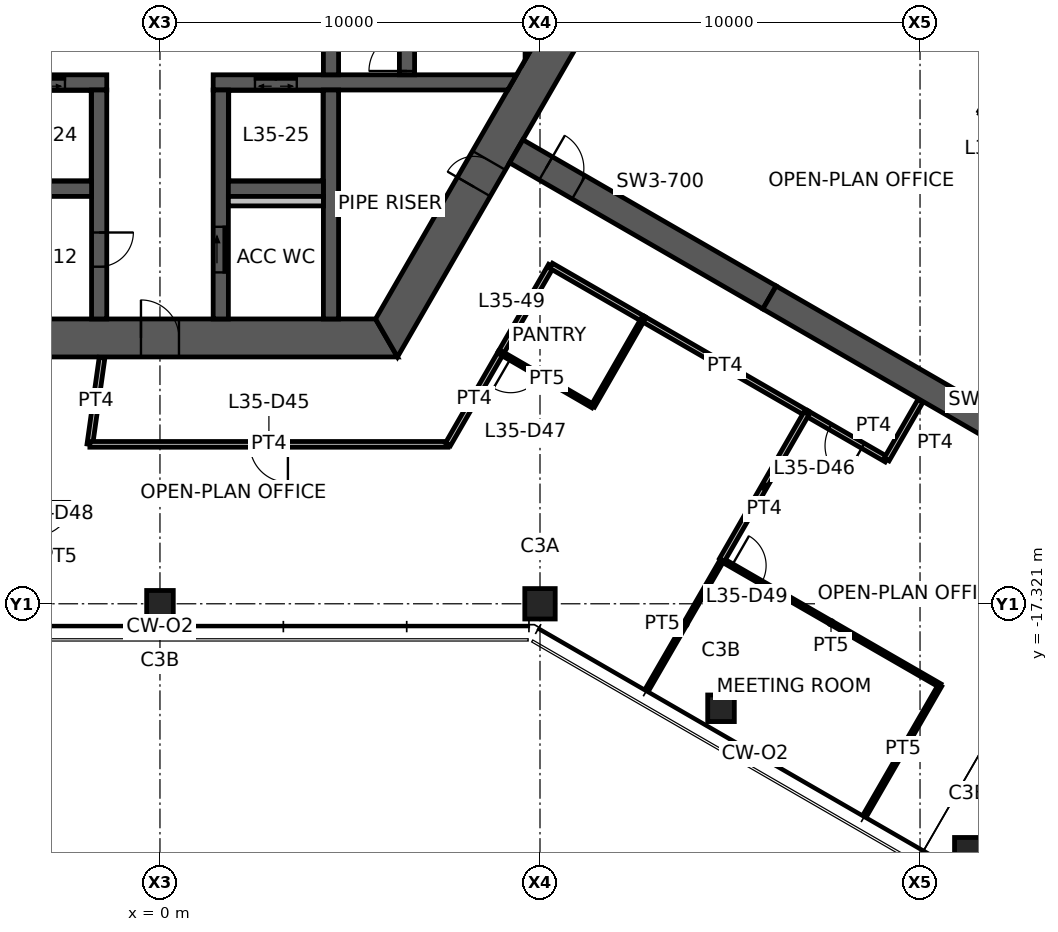
"""IFC4 building model, lengths in metres.
Left out: names, types, materials, properties, quantities, classifications, styles, units other than length and angle.
Written with IfcOpenShell. Run it as: python <this file> out.ifc"""

import sys

from ifc_helpers import new_model, si_unit, direction, frame, frame_2d, origin, origin_2d, place, context, subcontext, project, spatial, polyline, rectangle, hollow_rectangle, outline, extrude, element, fill, save


model = new_model("IFC4")
c1 = context("Model", 3, precision=1e-05, world=origin(), true_north=direction((0.0, 1.0)))
c2 = subcontext(c1, "Body", "Model", "MODEL_VIEW")
j1 = project(units=[si_unit("LENGTHUNIT", "METRE"), si_unit("PLANEANGLEUNIT", "RADIAN")], contexts=[c1])
p1 = place(None, origin())
s1 = spatial("IfcSite", under=j1, at=p1, CompositionType="ELEMENT")
p2 = place(p1, origin())
s2 = spatial("IfcBuilding", under=s1, at=p2, CompositionType="ELEMENT")
p3 = place(p2, frame((0.0, 0.0, 140.9)))
s3 = spatial("IfcBuildingStorey", under=s2, at=p3, CompositionType="ELEMENT", Elevation=140.9)
p4 = place(p3, frame((10.0, -17.321, 0.0), z_axis=(0.0, 0.0, 1.0), x_axis=(1.0, 0.0, 0.0)))
e1 = element("IfcColumn", 1, at=p4, inside=s3, PredefinedType="COLUMN", context=c2, shape_type="SweptSolid", body=[
    extrude(hollow_rectangle(XDim=0.8, YDim=0.8, WallThickness=0.045, at=origin_2d()), origin(), (0.0, 0.0, 1.0), 3.9),
])
for number, where, z_axis, x_axis in (
    (2, (0.0, -17.321, 0.0), (0.0, 0.0, 1.0), (1.0, 0.0, 0.0)),
    (3, (14.763, -20.071, 0.0), (0.0, 0.0, 1.0), (1.0, 0.0, 0.0)),
    (4, (21.258, -23.821, 0.0), (0.0, 0.0, 1.0), (1.0, 0.0, 0.0)),
):
    element("IfcColumn", number, at=place(p3, frame(where, z_axis=z_axis, x_axis=x_axis)), inside=s3, PredefinedType="COLUMN", context=c2, shape_type="SweptSolid", body=[
        extrude(hollow_rectangle(XDim=0.7, YDim=0.7, WallThickness=0.036, at=origin_2d()), origin(), (0.0, 0.0, 1.0), 3.9),
    ])
p5 = place(p3, frame((-5.961, -10.325, 0.0), z_axis=(0.0, 0.0, 1.0), x_axis=(1.0, 0.0, 0.0)))
e5 = element("IfcWall", 5, at=p5, inside=s3, PredefinedType="SHEAR", context=c2, shape_type="SweptSolid", body=[
    extrude(outline(polyline([(-0.289, -0.5), (5.461, -0.5), (6.461, -0.5), (12.211, -0.5), (11.634, 0.5), (6.461, 0.5), (5.461, 0.5), (0.289, 0.5), (-0.289, -0.5)])), origin(), (0.0, 0.0, 1.0), 3.9),
])
p6 = place(p5, frame((5.461, 0.0, 0.0)))
e6 = element("IfcOpeningElement", 6, at=p6, cuts=e5, PredefinedType="OPENING", context=c2, shape_type="SweptSolid", body=[
    extrude(rectangle(XDim=1.0, YDim=2.1, at=frame_2d((0.5, 1.05))), frame((0.0, 0.51, 0.0), z_axis=(0.0, -1.0, 0.0), x_axis=(1.0, 0.0, 0.0)), (0.0, 0.0, 1.0), 1.02),
])
p7 = place(p3, frame((5.961, -10.325, 0.0), z_axis=(0.0, 0.0, 1.0), x_axis=(0.500004296715, 0.866022923061, 0.0)))
e7 = element("IfcWall", 7, at=p7, inside=s3, PredefinedType="SHEAR", context=c2, shape_type="SweptSolid", body=[
    extrude(outline(polyline([(-0.289, -0.5), (4.594, -0.5), (5.394, -0.5), (12.211, -0.5), (11.634, 0.5), (5.394, 0.5), (4.594, 0.5), (0.289, 0.5), (-0.289, -0.5)])), origin(), (0.0, 0.0, 1.0), 3.9),
])
p8 = place(p7, frame((4.594, 0.0, 0.0)))
e8 = element("IfcOpeningElement", 8, at=p8, cuts=e7, PredefinedType="OPENING", context=c2, shape_type="SweptSolid", body=[
    extrude(rectangle(XDim=0.8, YDim=2.1, at=frame_2d((0.4, 1.05))), frame((0.0, 0.51, 0.0), z_axis=(0.0, -1.0, 0.0), x_axis=(1.0, 0.0, 0.0)), (0.0, 0.0, 1.0), 1.02),
])
p9 = place(p3, frame((9.375, -5.413, 0.0), z_axis=(0.0, 0.0, 1.0), x_axis=(0.866032377459, -0.499987921047, 0.0)))
e9 = element("IfcWall", 9, at=p9, inside=s3, PredefinedType="SHEAR", context=c2, shape_type="SweptSolid", body=[
    extrude(rectangle(XDim=7.696, YDim=0.7, at=frame_2d((3.848, 0.0))), origin(), (0.0, 0.0, 1.0), 3.9),
])
p10 = place(p9, frame((0.9, 0.0, 0.0)))
e10 = element("IfcOpeningElement", 10, at=p10, cuts=e9, PredefinedType="OPENING", context=c2, shape_type="SweptSolid", body=[
    extrude(rectangle(XDim=1.0, YDim=2.1, at=frame_2d((0.5, 1.05))), frame((0.0, 0.36, 0.0), z_axis=(0.0, -1.0, 0.0), x_axis=(1.0, 0.0, 0.0)), (0.0, 0.0, 1.0), 0.72),
])
p11 = place(p3, frame((16.039, -9.26, 0.0), z_axis=(0.0, 0.0, 1.0), x_axis=(0.866024837091, -0.50000098154, 0.0)))
e11 = element("IfcWall", 11, at=p11, inside=s3, PredefinedType="SHEAR", context=c2, shape_type="SweptSolid", body=[
    extrude(rectangle(XDim=13.0, YDim=0.7, at=frame_2d((6.5, 0.0))), origin(), (0.0, 0.0, 1.0), 3.9),
])
p12 = place(p3, frame((-9.266, -3.6, 0.0), z_axis=(0.0, 0.0, 1.0), x_axis=(1.0, 0.0, 0.0)))
e12 = element("IfcWall", 12, at=p12, inside=s3, PredefinedType="SHEAR", context=c2, shape_type="SweptSolid", body=[
    extrude(outline(polyline([(0.115, -0.2), (3.116, -0.2), (4.417, -0.2), (5.667, -0.2), (6.767, -0.2), (7.866, -0.2), (7.866, 0.2), (6.767, 0.2), (5.667, 0.2), (4.417, 0.2), (3.116, 0.2), (-0.115, 0.2), (0.115, -0.2)])), origin(), (0.0, 0.0, 1.0), 3.9),
])
p13 = place(p12, frame((5.667, 0.0, 0.0)))
e13 = element("IfcOpeningElement", 13, at=p13, cuts=e12, PredefinedType="OPENING", context=c2, shape_type="SweptSolid", body=[
    extrude(rectangle(XDim=1.1, YDim=2.1, at=frame_2d((0.55, 1.05))), frame((0.0, 0.21, 0.0), z_axis=(0.0, -1.0, 0.0), x_axis=(1.0, 0.0, 0.0)), (0.0, 0.0, 1.0), 0.42),
])
p14 = place(p12, frame((3.116, 0.0, 0.0)))
e14 = element("IfcOpeningElement", 14, at=p14, cuts=e12, PredefinedType="OPENING", context=c2, shape_type="SweptSolid", body=[
    extrude(rectangle(XDim=1.3, YDim=2.1, at=frame_2d((0.65, 1.05))), frame((0.0, 0.21, 0.0), z_axis=(0.0, -1.0, 0.0), x_axis=(1.0, 0.0, 0.0)), (0.0, 0.0, 1.0), 0.42),
])
p15 = place(p3, frame((1.4, -3.6, 0.0), z_axis=(0.0, 0.0, 1.0), x_axis=(1.0, 0.0, 0.0)))
e15 = element("IfcWall", 15, at=p15, inside=s3, PredefinedType="SHEAR", context=c2, shape_type="SweptSolid", body=[
    extrude(outline(polyline([(0.0, -0.2), (1.1, -0.2), (2.2, -0.2), (7.751, -0.2), (7.982, 0.2), (2.2, 0.2), (1.1, 0.2), (0.0, 0.2), (0.0, -0.2)])), origin(), (0.0, 0.0, 1.0), 3.9),
])
p16 = place(p15, frame((1.1, 0.0, 0.0)))
e16 = element("IfcOpeningElement", 16, at=p16, cuts=e15, PredefinedType="OPENING", context=c2, shape_type="SweptSolid", body=[
    extrude(rectangle(XDim=1.1, YDim=2.1, at=frame_2d((0.55, 1.05))), frame((0.0, 0.21, 0.0), z_axis=(0.0, -1.0, 0.0), x_axis=(1.0, 0.0, 0.0)), (0.0, 0.0, 1.0), 0.42),
])
p17 = place(p3, frame((-1.6, -3.8, 0.0), z_axis=(0.0, 0.0, 1.0), x_axis=(0.0, -1.0, 0.0)))
e17 = element("IfcWall", 17, at=p17, inside=s3, PredefinedType="SHEAR", context=c2, shape_type="SweptSolid", body=[
    extrude(rectangle(XDim=6.025, YDim=0.4, at=frame_2d((3.012, 0.0))), origin(), (0.0, 0.0, 1.0), 3.9),
])
p18 = place(p17, frame((3.75, 0.0, 0.0)))
e18 = element("IfcOpeningElement", 18, at=p18, cuts=e17, PredefinedType="OPENING", context=c2, shape_type="SweptSolid", body=[
    extrude(rectangle(XDim=0.9, YDim=2.1, at=frame_2d((0.45, 1.05))), frame((0.0, 0.21, 0.0), z_axis=(0.0, -1.0, 0.0), x_axis=(1.0, 0.0, 0.0)), (0.0, 0.0, 1.0), 0.42),
])
p19 = place(p3, frame((1.6, -3.8, 0.0), z_axis=(0.0, 0.0, 1.0), x_axis=(0.0, -1.0, 0.0)))
e19 = element("IfcWall", 19, at=p19, inside=s3, PredefinedType="SHEAR", context=c2, shape_type="SweptSolid", body=[
    extrude(rectangle(XDim=6.025, YDim=0.4, at=frame_2d((3.012, 0.0))), origin(), (0.0, 0.0, 1.0), 3.9),
])
p20 = place(p19, frame((3.6, 0.0, 0.0)))
e20 = element("IfcOpeningElement", 20, at=p20, cuts=e19, PredefinedType="OPENING", context=c2, shape_type="SweptSolid", body=[
    extrude(rectangle(XDim=1.2, YDim=2.1, at=frame_2d((0.6, 1.05))), frame((0.0, 0.21, 0.0), z_axis=(0.0, -1.0, 0.0), x_axis=(1.0, 0.0, 0.0)), (0.0, 0.0, 1.0), 0.42),
])
p21 = place(p3, frame((4.5, -3.4, 0.0), z_axis=(0.0, 0.0, 1.0), x_axis=(0.0, 1.0, 0.0)))
e21 = element("IfcWall", 21, at=p21, inside=s3, PredefinedType="SHEAR", context=c2, shape_type="SweptSolid", body=[
    extrude(rectangle(XDim=6.8, YDim=0.4, at=frame_2d((3.4, 0.0))), origin(), (0.0, 0.0, 1.0), 3.9),
])
p22 = place(p21, frame((2.9, 0.0, 0.0)))
e22 = element("IfcOpeningElement", 22, at=p22, cuts=e21, PredefinedType="OPENING", context=c2, shape_type="SweptSolid", body=[
    extrude(rectangle(XDim=1.0, YDim=2.1, at=frame_2d((0.5, 1.05))), frame((0.0, 0.21, 0.0), z_axis=(0.0, -1.0, 0.0), x_axis=(1.0, 0.0, 0.0)), (0.0, 0.0, 1.0), 0.42),
])
p23 = place(p3, frame((6.5, -3.4, 0.0), z_axis=(0.0, 0.0, 1.0), x_axis=(0.0, 1.0, 0.0)))
e23 = element("IfcWall", 23, at=p23, inside=s3, PredefinedType="SHEAR", context=c2, shape_type="SweptSolid", body=[
    extrude(rectangle(XDim=6.8, YDim=0.4, at=frame_2d((3.4, 0.0))), origin(), (0.0, 0.0, 1.0), 3.9),
])
p24 = place(p23, frame((0.1, 0.0, 0.0)))
e24 = element("IfcOpeningElement", 24, at=p24, cuts=e23, PredefinedType="OPENING", context=c2, shape_type="SweptSolid", body=[
    extrude(rectangle(XDim=1.0, YDim=2.1, at=frame_2d((0.5, 1.05))), frame((0.0, 0.21, 0.0), z_axis=(0.0, -1.0, 0.0), x_axis=(1.0, 0.0, 0.0)), (0.0, 0.0, 1.0), 0.42),
])
p25 = place(p3, frame((4.5, -3.8, 0.0), z_axis=(0.0, 0.0, 1.0), x_axis=(0.0, -1.0, 0.0)))
e25 = element("IfcWall", 25, at=p25, inside=s3, PredefinedType="SHEAR", context=c2, shape_type="SweptSolid", body=[
    extrude(rectangle(XDim=6.025, YDim=0.4, at=frame_2d((3.012, 0.0))), origin(), (0.0, 0.0, 1.0), 3.9),
])
for number, where, z_axis, x_axis in (
    (26, (-4.3, -6.4, 0.0), (0.0, 0.0, 1.0), (1.0, 0.0, 0.0)),
    (27, (1.8, -6.4, 0.0), (0.0, 0.0, 1.0), (1.0, 0.0, 0.0)),
):
    element("IfcWall", number, at=place(p3, frame(where, z_axis=z_axis, x_axis=x_axis)), inside=s3, PredefinedType="SHEAR", context=c2, shape_type="SweptSolid", body=[
        extrude(rectangle(XDim=2.5, YDim=0.4, at=frame_2d((1.25, 0.0))), origin(), (0.0, 0.0, 1.0), 3.9),
    ])
p26 = place(p3, frame((9.808, -2.662, 0.0), z_axis=(0.0, 0.0, 1.0), x_axis=(0.0, 1.0, 0.0)))
e28 = element("IfcWall", 28, at=p26, inside=s3, PredefinedType="SHEAR", context=c2, shape_type="SweptSolid", body=[
    extrude(outline(polyline([(0.346, -0.2), (4.978, -0.2), (5.671, 0.2), (-0.346, 0.2), (0.346, -0.2)])), origin(), (0.0, 0.0, 1.0), 3.9),
])
p27 = place(p3, frame((1.8, -6.725, 0.0), z_axis=(0.0, 0.0, 1.0), x_axis=(1.0, 0.0, 0.0)))
e29 = element("IfcWall", 29, at=p27, inside=s3, PredefinedType="PLUMBINGWALL", context=c2, shape_type="SweptSolid", body=[
    extrude(rectangle(XDim=2.5, YDim=0.25, at=frame_2d((1.25, 0.0))), origin(), (0.0, 0.0, 1.0), 3.9),
])
p28 = place(p3, frame((10.292, -8.425, 0.0), z_axis=(0.0, 0.0, 1.0), x_axis=(-0.499966561876, -0.866044708433, 0.0)))
e30 = element("IfcWall", 30, at=p28, inside=s3, PredefinedType="PARTITIONING", context=c2, shape_type="SweptSolid", body=[
    extrude(rectangle(XDim=2.655, YDim=0.15, at=frame_2d((1.328, 0.0))), origin(), (0.0, 0.0, 1.0), 2.95),
])
p29 = place(p3, frame((12.721, -9.827, 0.0), z_axis=(0.0, 0.0, 1.0), x_axis=(-0.866049342339, 0.499958534914, 0.0)))
e31 = element("IfcWall", 31, at=p29, inside=s3, PredefinedType="PARTITIONING", context=c2, shape_type="SweptSolid", body=[
    extrude(rectangle(XDim=2.805, YDim=0.15, at=frame_2d((1.402, 0.0))), origin(), (0.0, 0.0, 1.0), 2.95),
])
p30 = place(p3, frame((-1.844, -13.125, 0.0), z_axis=(0.0, 0.0, 1.0), x_axis=(0.139119980631, 0.990275532864, 0.0)))
e32 = element("IfcWall", 32, at=p30, inside=s3, PredefinedType="PARTITIONING", context=c2, shape_type="SweptSolid", body=[
    extrude(rectangle(XDim=2.302, YDim=0.15, at=frame_2d((1.151, 0.0))), origin(), (0.0, 0.0, 1.0), 2.95),
])
p31 = place(p3, frame((7.578, -13.125, 0.0), z_axis=(0.0, 0.0, 1.0), x_axis=(-1.0, 0.0, 0.0)))
e33 = element("IfcWall", 33, at=p31, inside=s3, PredefinedType="PARTITIONING", context=c2, shape_type="SweptSolid", body=[
    extrude(rectangle(XDim=9.422, YDim=0.15, at=frame_2d((4.711, 0.0))), origin(), (0.0, 0.0, 1.0), 2.95),
])
p32 = place(p31, frame((4.211, 0.0, 0.0)))
e34 = element("IfcOpeningElement", 34, at=p32, cuts=e33, PredefinedType="OPENING", context=c2, shape_type="SweptSolid", body=[
    extrude(rectangle(XDim=1.0, YDim=2.1, at=frame_2d((0.5, 1.05))), frame((0.0, 0.085, 0.0), z_axis=(0.0, -1.0, 0.0), x_axis=(1.0, 0.0, 0.0)), (0.0, 0.0, 1.0), 0.17),
])
p33 = place(p3, frame((8.969, -10.716, 0.0), z_axis=(0.0, 0.0, 1.0), x_axis=(-0.500008568482, -0.866020456713, 0.0)))
e35 = element("IfcWall", 35, at=p33, inside=s3, PredefinedType="PARTITIONING", context=c2, shape_type="SweptSolid", body=[
    extrude(rectangle(XDim=2.782, YDim=0.15, at=frame_2d((1.391, 0.0))), origin(), (0.0, 0.0, 1.0), 2.95),
])
p34 = place(p3, frame((17.021, -12.31, 0.0), z_axis=(0.0, 0.0, 1.0), x_axis=(-0.866018071205, 0.500012700186, 0.0)))
e36 = element("IfcWall", 36, at=p34, inside=s3, PredefinedType="PARTITIONING", context=c2, shape_type="SweptSolid", body=[
    extrude(rectangle(XDim=4.975, YDim=0.15, at=frame_2d((2.488, 0.0))), origin(), (0.0, 0.0, 1.0), 2.95),
])
p35 = place(p3, frame((19.121, -13.522, 0.0), z_axis=(0.0, 0.0, 1.0), x_axis=(-0.866000196749, 0.500043657324, 0.0)))
e37 = element("IfcWall", 37, at=p35, inside=s3, PredefinedType="PARTITIONING", context=c2, shape_type="SweptSolid", body=[
    extrude(rectangle(XDim=2.434, YDim=0.15, at=frame_2d((1.217, 0.0))), origin(), (0.0, 0.0, 1.0), 2.95),
])
p36 = place(p35, frame((0.717, 0.0, 0.0)))
e38 = element("IfcOpeningElement", 38, at=p36, cuts=e37, PredefinedType="OPENING", context=c2, shape_type="SweptSolid", body=[
    extrude(rectangle(XDim=1.0, YDim=2.1, at=frame_2d((0.5, 1.05))), frame((0.0, 0.085, 0.0), z_axis=(0.0, -1.0, 0.0), x_axis=(1.0, 0.0, 0.0)), (0.0, 0.0, 1.0), 0.17),
])
p37 = place(p3, frame((20.011, -11.981, 0.0), z_axis=(0.0, 0.0, 1.0), x_axis=(-0.500062787734, -0.865989150234, 0.0)))
e39 = element("IfcWall", 39, at=p37, inside=s3, PredefinedType="PARTITIONING", context=c2, shape_type="SweptSolid", body=[
    extrude(rectangle(XDim=1.78, YDim=0.15, at=frame_2d((0.89, 0.0))), origin(), (0.0, 0.0, 1.0), 2.95),
])
p38 = place(p3, frame((11.392, -12.119, 0.0), z_axis=(0.0, 0.0, 1.0), x_axis=(-0.865255114713, 0.501331812737, 0.0)))
e40 = element("IfcWall", 40, at=p38, inside=s3, PredefinedType="PARTITIONING", context=c2, shape_type="SweptSolid", body=[
    extrude(rectangle(XDim=2.8, YDim=0.1, at=frame_2d((1.4, 0.0))), origin(), (0.0, 0.0, 1.0), 2.95),
])
p39 = place(p38, frame((1.6, 0.0, 0.0)))
e41 = element("IfcOpeningElement", 41, at=p39, cuts=e40, PredefinedType="OPENING", context=c2, shape_type="SweptSolid", body=[
    extrude(rectangle(XDim=0.9, YDim=2.1, at=frame_2d((0.45, 1.05))), frame((0.0, 0.06, 0.0), z_axis=(0.0, -1.0, 0.0), x_axis=(1.0, 0.0, 0.0)), (0.0, 0.0, 1.0), 0.12),
])
p40 = place(p3, frame((12.713, -9.822, 0.0), z_axis=(0.0, 0.0, 1.0), x_axis=(-0.49852824611, -0.866873455488, 0.0)))
e42 = element("IfcWall", 42, at=p40, inside=s3, PredefinedType="PARTITIONING", context=c2, shape_type="SweptSolid", body=[
    extrude(rectangle(XDim=2.65, YDim=0.1, at=frame_2d((1.325, 0.0))), origin(), (0.0, 0.0, 1.0), 2.95),
])
p41 = place(p3, frame((12.84, -19.543, 0.0), z_axis=(0.0, 0.0, 1.0), x_axis=(0.501092951989, 0.865393467428, 0.0)))
e43 = element("IfcWall", 43, at=p41, inside=s3, PredefinedType="PARTITIONING", context=c2, shape_type="SweptSolid", body=[
    extrude(rectangle(XDim=3.905, YDim=0.1, at=frame_2d((1.953, 0.0))), origin(), (0.0, 0.0, 1.0), 2.95),
])
p42 = place(p3, frame((14.79, -16.165, 0.0), z_axis=(0.0, 0.0, 1.0), x_axis=(0.866359914703, -0.499420161984, 0.0)))
e44 = element("IfcWall", 44, at=p42, inside=s3, PredefinedType="PARTITIONING", context=c2, shape_type="SweptSolid", body=[
    extrude(rectangle(XDim=6.619, YDim=0.1, at=frame_2d((3.31, 0.0))), origin(), (0.0, 0.0, 1.0), 2.95),
])
p43 = place(p42, frame((0.3, 0.0, 0.0)))
e45 = element("IfcOpeningElement", 45, at=p43, cuts=e44, PredefinedType="OPENING", context=c2, shape_type="SweptSolid", body=[
    extrude(rectangle(XDim=0.9, YDim=2.1, at=frame_2d((0.45, 1.05))), frame((0.0, 0.06, 0.0), z_axis=(0.0, -1.0, 0.0), x_axis=(1.0, 0.0, 0.0)), (0.0, 0.0, 1.0), 0.12),
])
p44 = place(p3, frame((20.525, -19.471, 0.0), z_axis=(0.0, 0.0, 1.0), x_axis=(-0.499996613652, -0.866027358884, 0.0)))
e46 = element("IfcWall", 46, at=p44, inside=s3, PredefinedType="PARTITIONING", context=c2, shape_type="SweptSolid", body=[
    extrude(rectangle(XDim=3.88, YDim=0.1, at=frame_2d((1.94, 0.0))), origin(), (0.0, 0.0, 1.0), 2.95),
])
p45 = place(p3, frame((17.013, -12.305, 0.0), z_axis=(0.0, 0.0, 1.0), x_axis=(-0.499081704511, -0.866554933182, 0.0)))
e47 = element("IfcWall", 47, at=p45, inside=s3, PredefinedType="PARTITIONING", context=c2, shape_type="SweptSolid", body=[
    extrude(rectangle(XDim=4.454, YDim=0.15, at=frame_2d((2.227, 0.0))), origin(), (0.0, 0.0, 1.0), 2.95),
])
p46 = place(p6, origin())
e48 = element("IfcDoor", 48, at=p46, inside=s3, OperationType="SINGLE_SWING_LEFT", PredefinedType="DOOR", context=c2, shape_type="SweptSolid", body=[
    extrude(rectangle(XDim=1.0, YDim=2.1, at=frame_2d((0.5, 1.05))), frame((0.0, 0.025, 0.0), z_axis=(0.0, -1.0, 0.0), x_axis=(1.0, 0.0, 0.0)), (0.0, 0.0, 1.0), 0.05),
])
fill(e6, e48)
p47 = place(p8, origin())
e49 = element("IfcDoor", 49, at=p47, inside=s3, OperationType="SINGLE_SWING_LEFT", PredefinedType="DOOR", context=c2, shape_type="SweptSolid", body=[
    extrude(rectangle(XDim=0.8, YDim=2.1, at=frame_2d((0.4, 1.05))), frame((0.0, 0.025, 0.0), z_axis=(0.0, -1.0, 0.0), x_axis=(1.0, 0.0, 0.0)), (0.0, 0.0, 1.0), 0.05),
])
fill(e8, e49)
p48 = place(p24, origin())
e50 = element("IfcDoor", 50, at=p48, inside=s3, OperationType="SINGLE_SWING_LEFT", PredefinedType="DOOR", context=c2, shape_type="SweptSolid", body=[
    extrude(rectangle(XDim=1.0, YDim=2.1, at=frame_2d((0.5, 1.05))), frame((0.0, 0.025, 0.0), z_axis=(0.0, -1.0, 0.0), x_axis=(1.0, 0.0, 0.0)), (0.0, 0.0, 1.0), 0.05),
])
fill(e24, e50)
p49 = place(p20, origin())
e51 = element("IfcDoor", 51, at=p49, inside=s3, OperationType="SLIDING_TO_LEFT", PredefinedType="DOOR", context=c2, shape_type="SweptSolid", body=[
    extrude(rectangle(XDim=1.2, YDim=2.1, at=frame_2d((0.6, 1.05))), frame((0.0, 0.025, 0.0), z_axis=(0.0, -1.0, 0.0), x_axis=(1.0, 0.0, 0.0)), (0.0, 0.0, 1.0), 0.05),
])
fill(e20, e51)
p50 = place(p18, origin())
e52 = element("IfcDoor", 52, at=p50, inside=s3, OperationType="SINGLE_SWING_LEFT", PredefinedType="DOOR", context=c2, shape_type="SweptSolid", body=[
    extrude(rectangle(XDim=0.9, YDim=2.1, at=frame_2d((0.45, 1.05))), frame((0.0, 0.025, 0.0), z_axis=(0.0, -1.0, 0.0), x_axis=(1.0, 0.0, 0.0)), (0.0, 0.0, 1.0), 0.05),
])
fill(e18, e52)
p51 = place(p10, origin())
e53 = element("IfcDoor", 53, at=p51, inside=s3, OperationType="SINGLE_SWING_LEFT", PredefinedType="DOOR", context=c2, shape_type="SweptSolid", body=[
    extrude(rectangle(XDim=1.0, YDim=2.1, at=frame_2d((0.5, 1.05))), frame((0.0, 0.025, 0.0), z_axis=(0.0, -1.0, 0.0), x_axis=(1.0, 0.0, 0.0)), (0.0, 0.0, 1.0), 0.05),
])
fill(e10, e53)
p52 = place(p32, origin())
e54 = element("IfcDoor", 54, at=p52, inside=s3, OperationType="SINGLE_SWING_LEFT", PredefinedType="DOOR", context=c2, shape_type="SweptSolid", body=[
    extrude(rectangle(XDim=1.0, YDim=2.1, at=frame_2d((0.5, 1.05))), frame((0.0, 0.025, 0.0), z_axis=(0.0, -1.0, 0.0), x_axis=(1.0, 0.0, 0.0)), (0.0, 0.0, 1.0), 0.05),
])
fill(e34, e54)
p53 = place(p36, origin())
e55 = element("IfcDoor", 55, at=p53, inside=s3, OperationType="SINGLE_SWING_LEFT", PredefinedType="DOOR", context=c2, shape_type="SweptSolid", body=[
    extrude(rectangle(XDim=1.0, YDim=2.1, at=frame_2d((0.5, 1.05))), frame((0.0, 0.025, 0.0), z_axis=(0.0, -1.0, 0.0), x_axis=(1.0, 0.0, 0.0)), (0.0, 0.0, 1.0), 0.05),
])
fill(e38, e55)
p54 = place(p39, origin())
e56 = element("IfcDoor", 56, at=p54, inside=s3, OperationType="SINGLE_SWING_RIGHT", PredefinedType="DOOR", context=c2, shape_type="SweptSolid", body=[
    extrude(rectangle(XDim=0.9, YDim=2.1, at=frame_2d((0.45, 1.05))), frame((0.0, 0.025, 0.0), z_axis=(0.0, -1.0, 0.0), x_axis=(1.0, 0.0, 0.0)), (0.0, 0.0, 1.0), 0.05),
])
fill(e41, e56)
p55 = place(p43, origin())
e57 = element("IfcDoor", 57, at=p55, inside=s3, OperationType="SINGLE_SWING_LEFT", PredefinedType="DOOR", context=c2, shape_type="SweptSolid", body=[
    extrude(rectangle(XDim=0.9, YDim=2.1, at=frame_2d((0.45, 1.05))), frame((0.0, 0.025, 0.0), z_axis=(0.0, -1.0, 0.0), x_axis=(1.0, 0.0, 0.0)), (0.0, 0.0, 1.0), 0.05),
])
fill(e45, e57)
p56 = place(p16, origin())
e58 = element("IfcDoor", 58, at=p56, inside=s3, OperationType="DOUBLE_DOOR_SLIDING", PredefinedType="DOOR", context=c2, shape_type="SweptSolid", body=[
    extrude(rectangle(XDim=1.1, YDim=2.1, at=frame_2d((0.55, 1.05))), frame((0.0, 0.025, 0.0), z_axis=(0.0, -1.0, 0.0), x_axis=(1.0, 0.0, 0.0)), (0.0, 0.0, 1.0), 0.05),
])
fill(e16, e58)
p57 = place(p13, origin())
e59 = element("IfcDoor", 59, at=p57, inside=s3, OperationType="DOUBLE_DOOR_SLIDING", PredefinedType="DOOR", context=c2, shape_type="SweptSolid", body=[
    extrude(rectangle(XDim=1.1, YDim=2.1, at=frame_2d((0.55, 1.05))), frame((0.0, 0.025, 0.0), z_axis=(0.0, -1.0, 0.0), x_axis=(1.0, 0.0, 0.0)), (0.0, 0.0, 1.0), 0.05),
])
fill(e13, e59)
save(model, sys.argv[1])
